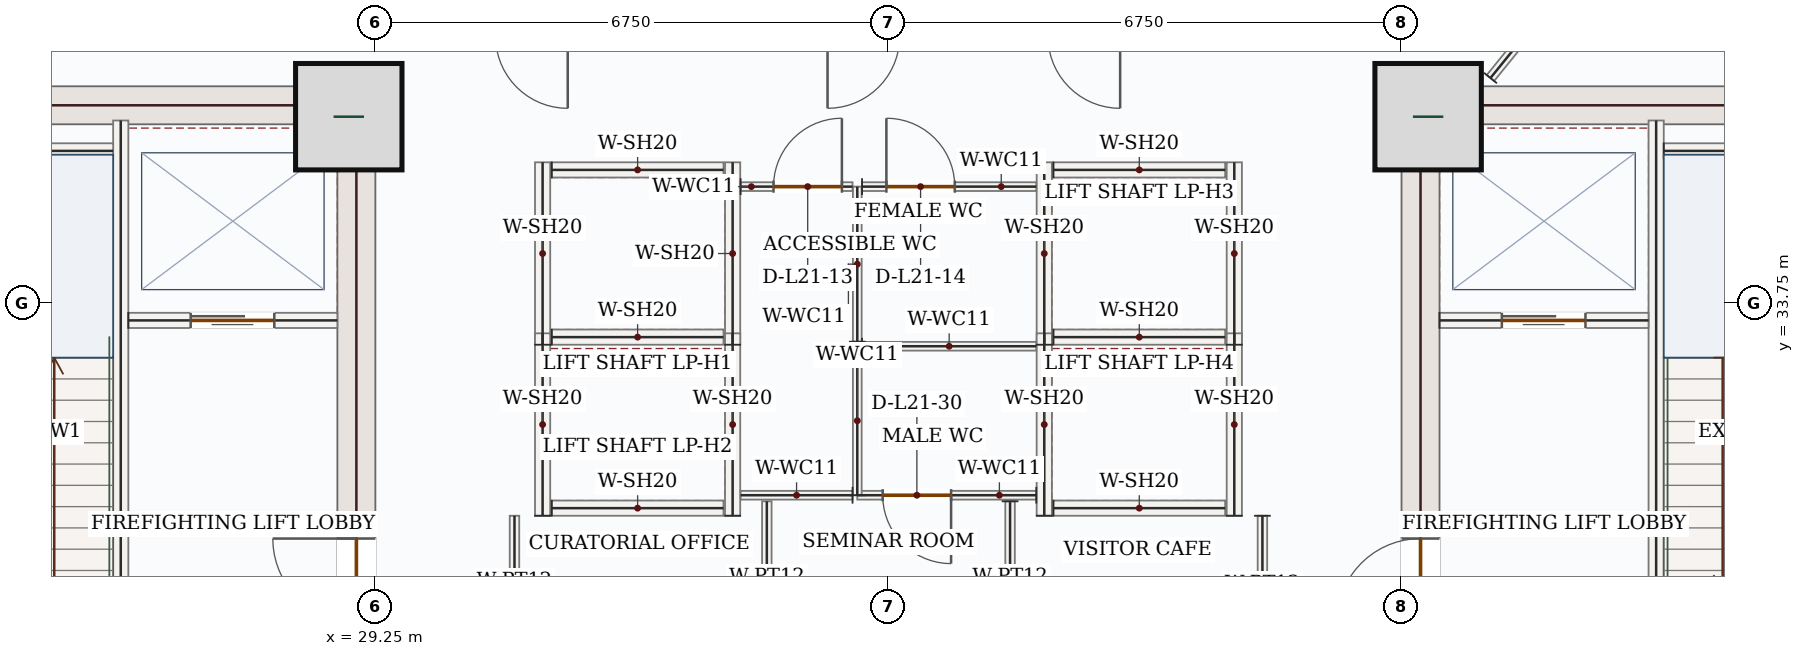
"""IFC4 building model, lengths in metres.
Left out: names, types, materials, properties, quantities, classifications, styles, units other than length and angle.
Written with IfcOpenShell. Run it as: python <this file> out.ifc"""

import sys

from ifc_helpers import new_model, si_unit, direction, frame, frame_2d, origin, origin_2d, place, context, subcontext, project, spatial, rectangle, extrude, source, transform, mapped, element, fill, save


model = new_model("IFC4")
c1 = context("Model", 3, precision=1e-05, world=origin(), true_north=direction((0.0, 1.0)))
c2 = subcontext(c1, "Body", "Model", "MODEL_VIEW")
j1 = project(units=[si_unit("LENGTHUNIT", "METRE"), si_unit("PLANEANGLEUNIT", "RADIAN")], contexts=[c1])
p1 = place(None, origin())
s1 = spatial("IfcSite", under=j1, at=p1, CompositionType="ELEMENT")
p2 = place(p1, origin())
s2 = spatial("IfcBuilding", under=s1, at=p2, CompositionType="ELEMENT")
p3 = place(p2, frame((0.0, 0.0, 96.3)))
s3 = spatial("IfcBuildingStorey", under=s2, at=p3, CompositionType="ELEMENT", Elevation=96.3)
p4 = place(p3, frame((29.0, 28.05, 0.0), z_axis=(0.0, 0.0, 1.0), x_axis=(0.0, 1.0, 0.0)))
e1 = element("IfcWall", 1, at=p4, inside=s3, PredefinedType="SHEAR", context=c2, shape_type="SweptSolid", body=[
    extrude(rectangle(XDim=8.55, YDim=0.5, at=frame_2d((4.275, 0.0))), origin(), (0.0, 0.0, 1.0), 3.95),
])
p5 = place(p4, frame((1.5, 0.0, 0.0)))
e2 = element("IfcOpeningElement", 2, at=p5, cuts=e1, PredefinedType="OPENING", context=c2, shape_type="SweptSolid", body=[
    extrude(rectangle(XDim=1.1, YDim=2.2, at=frame_2d((0.55, 1.1))), frame((0.0, 0.26, 0.0), z_axis=(0.0, -1.0, 0.0), x_axis=(1.0, 0.0, 0.0)), (0.0, 0.0, 1.0), 0.52),
])
m1 = source(origin(), c2, "Body", "SweptSolid", [
    extrude(rectangle(XDim=7.0, YDim=0.5, at=frame_2d((3.5, 0.0))), origin(), (0.0, 0.0, 1.0), 3.95),
])
p6 = place(p3, frame((21.75, 36.35, 0.0), z_axis=(0.0, 0.0, 1.0), x_axis=(1.0, 0.0, 0.0)))
e3 = element("IfcWall", 3, at=p6, inside=s3, PredefinedType="SHEAR", context=c2, shape_type="MappedRepresentation", body=[
    mapped(m1, transform((0.0, 0.0, 0.0), x_axis=(1.0, 0.0, 0.0), y_axis=(0.0, 1.0, 0.0), z_axis=(0.0, 0.0, 1.0), scale=1.0)),
])
p7 = place(p3, frame((43.0, 28.05, 0.0), z_axis=(0.0, 0.0, 1.0), x_axis=(0.0, 1.0, 0.0)))
e4 = element("IfcWall", 4, at=p7, inside=s3, PredefinedType="SHEAR", context=c2, shape_type="SweptSolid", body=[
    extrude(rectangle(XDim=8.55, YDim=0.5, at=frame_2d((4.275, 0.0))), origin(), (0.0, 0.0, 1.0), 3.95),
])
p8 = place(p7, frame((1.5, 0.0, 0.0)))
e5 = element("IfcOpeningElement", 5, at=p8, cuts=e4, PredefinedType="OPENING", context=c2, shape_type="SweptSolid", body=[
    extrude(rectangle(XDim=1.1, YDim=2.2, at=frame_2d((0.55, 1.1))), frame((0.0, 0.26, 0.0), z_axis=(0.0, -1.0, 0.0), x_axis=(1.0, 0.0, 0.0)), (0.0, 0.0, 1.0), 0.52),
])
p9 = place(p3, frame((43.25, 36.35, 0.0), z_axis=(0.0, 0.0, 1.0), x_axis=(1.0, 0.0, 0.0)))
e6 = element("IfcWall", 6, at=p9, inside=s3, PredefinedType="SHEAR", context=c2, shape_type="MappedRepresentation", body=[
    mapped(m1, transform((0.0, 0.0, 0.0), x_axis=(1.0, 0.0, 0.0), y_axis=(0.0, 1.0, 0.0), z_axis=(0.0, 0.0, 1.0), scale=1.0)),
])
m2 = source(origin(), c2, "Body", "SweptSolid", [
    extrude(rectangle(XDim=1.4, YDim=1.4, at=origin_2d()), origin(), (0.0, 0.0, 1.0), 4.2),
])
for number, where, z_axis, x_axis in (
    (7, (28.9, 36.2, 0.0), (0.0, 0.0, 1.0), (1.0, 0.0, 0.0)),
    (8, (43.1, 36.2, 0.0), (0.0, 0.0, 1.0), (1.0, 0.0, 0.0)),
):
    element("IfcColumn", number, at=place(p3, frame(where, z_axis=z_axis, x_axis=x_axis)), inside=s3, PredefinedType="COLUMN", context=c2, shape_type="MappedRepresentation", body=[
        mapped(m2, transform((0.0, 0.0, 0.0), x_axis=(1.0, 0.0, 0.0), y_axis=(0.0, 1.0, 0.0), z_axis=(0.0, 0.0, 1.0), scale=1.0)),
    ])
p10 = place(p3, frame((25.9, 28.15, 0.0), z_axis=(0.0, 0.0, 1.0), x_axis=(0.0, 1.0, 0.0)))
e9 = element("IfcWall", 9, at=p10, inside=s3, PredefinedType="SOLIDWALL", context=c2, shape_type="SweptSolid", body=[
    extrude(rectangle(XDim=8.0, YDim=0.2, at=frame_2d((4.0, 0.0))), origin(), (0.0, 0.0, 1.0), 3.95),
])
p11 = place(p10, frame((0.4, 0.0, 0.0)))
e10 = element("IfcOpeningElement", 10, at=p11, cuts=e9, PredefinedType="OPENING", context=c2, shape_type="SweptSolid", body=[
    extrude(rectangle(XDim=1.05, YDim=2.15, at=frame_2d((0.525, 1.075))), frame((0.0, 0.11, 0.0), z_axis=(0.0, -1.0, 0.0), x_axis=(1.0, 0.0, 0.0)), (0.0, 0.0, 1.0), 0.22),
])
p12 = place(p3, frame((46.1, 28.15, 0.0), z_axis=(0.0, 0.0, 1.0), x_axis=(0.0, 1.0, 0.0)))
e11 = element("IfcWall", 11, at=p12, inside=s3, PredefinedType="SOLIDWALL", context=c2, shape_type="SweptSolid", body=[
    extrude(rectangle(XDim=8.0, YDim=0.2, at=frame_2d((4.0, 0.0))), origin(), (0.0, 0.0, 1.0), 3.95),
])
p13 = place(p12, frame((0.4, 0.0, 0.0)))
e12 = element("IfcOpeningElement", 12, at=p13, cuts=e11, PredefinedType="OPENING", context=c2, shape_type="SweptSolid", body=[
    extrude(rectangle(XDim=1.05, YDim=2.15, at=frame_2d((0.525, 1.075))), frame((0.0, 0.11, 0.0), z_axis=(0.0, -1.0, 0.0), x_axis=(1.0, 0.0, 0.0)), (0.0, 0.0, 1.0), 0.22),
])
m3 = source(origin(), c2, "Body", "SweptSolid", [
    extrude(rectangle(XDim=3.25, YDim=0.2, at=frame_2d((1.625, 0.0))), origin(), (0.0, 0.0, 1.0), 3.95),
])
for number, where, z_axis, x_axis in (
    (13, (22.55, 35.75, 0.0), (0.0, 0.0, 1.0), (1.0, 0.0, 0.0)),
    (14, (46.2, 35.75, 0.0), (0.0, 0.0, 1.0), (1.0, 0.0, 0.0)),
):
    element("IfcWall", number, at=place(p3, frame(where, z_axis=z_axis, x_axis=x_axis)), inside=s3, PredefinedType="SOLIDWALL", context=c2, shape_type="MappedRepresentation", body=[
        mapped(m3, transform((0.0, 0.0, 0.0), x_axis=(1.0, 0.0, 0.0), y_axis=(0.0, 1.0, 0.0), z_axis=(0.0, 0.0, 1.0), scale=1.0)),
    ])
p14 = place(p3, frame((26.0, 33.52, 0.0), z_axis=(0.0, 0.0, 1.0), x_axis=(1.0, 0.0, 0.0)))
e15 = element("IfcWall", 15, at=p14, inside=s3, PredefinedType="SOLIDWALL", context=c2, shape_type="SweptSolid", body=[
    extrude(rectangle(XDim=2.75, YDim=0.2, at=frame_2d((1.375, 0.0))), origin(), (0.0, 0.0, 1.0), 3.95),
])
p15 = place(p14, frame((0.82, 0.0, 0.0)))
e16 = element("IfcOpeningElement", 16, at=p15, cuts=e15, PredefinedType="OPENING", context=c2, shape_type="SweptSolid", body=[
    extrude(rectangle(XDim=1.1, YDim=2.15, at=frame_2d((0.55, 1.075))), frame((0.0, 0.11, 0.0), z_axis=(0.0, -1.0, 0.0), x_axis=(1.0, 0.0, 0.0)), (0.0, 0.0, 1.0), 0.22),
])
p16 = place(p3, frame((43.25, 33.52, 0.0), z_axis=(0.0, 0.0, 1.0), x_axis=(1.0, 0.0, 0.0)))
e17 = element("IfcWall", 17, at=p16, inside=s3, PredefinedType="SOLIDWALL", context=c2, shape_type="SweptSolid", body=[
    extrude(rectangle(XDim=2.75, YDim=0.2, at=frame_2d((1.375, 0.0))), origin(), (0.0, 0.0, 1.0), 3.95),
])
p17 = place(p16, frame((0.82, 0.0, 0.0)))
e18 = element("IfcOpeningElement", 18, at=p17, cuts=e17, PredefinedType="OPENING", context=c2, shape_type="SweptSolid", body=[
    extrude(rectangle(XDim=1.1, YDim=2.15, at=frame_2d((0.55, 1.075))), frame((0.0, 0.11, 0.0), z_axis=(0.0, -1.0, 0.0), x_axis=(1.0, 0.0, 0.0)), (0.0, 0.0, 1.0), 0.22),
])
m4 = source(origin(), c2, "Body", "SweptSolid", [
    extrude(rectangle(XDim=2.4, YDim=0.2, at=frame_2d((1.2, 0.0))), origin(), (0.0, 0.0, 1.0), 3.95),
])
for number, where, z_axis, x_axis in (
    (19, (31.45, 33.2, 0.0), (0.0, 0.0, 1.0), (0.0, 1.0, 0.0)),
    (20, (33.95, 33.2, 0.0), (0.0, 0.0, 1.0), (0.0, 1.0, 0.0)),
):
    element("IfcWall", number, at=place(p3, frame(where, z_axis=z_axis, x_axis=x_axis)), inside=s3, PredefinedType="SOLIDWALL", context=c2, shape_type="MappedRepresentation", body=[
        mapped(m4, transform((0.0, 0.0, 0.0), x_axis=(1.0, 0.0, 0.0), y_axis=(0.0, 1.0, 0.0), z_axis=(0.0, 0.0, 1.0), scale=1.0)),
    ])
m5 = source(origin(), c2, "Body", "SweptSolid", [
    extrude(rectangle(XDim=2.26, YDim=0.2, at=frame_2d((1.13, 0.0))), origin(), (0.0, 0.0, 1.0), 3.95),
])
for number, where, z_axis, x_axis in (
    (21, (31.57, 33.3, 0.0), (0.0, 0.0, 1.0), (1.0, 0.0, 0.0)),
    (22, (31.57, 35.5, 0.0), (0.0, 0.0, 1.0), (1.0, 0.0, 0.0)),
):
    element("IfcWall", number, at=place(p3, frame(where, z_axis=z_axis, x_axis=x_axis)), inside=s3, PredefinedType="SOLIDWALL", context=c2, shape_type="MappedRepresentation", body=[
        mapped(m5, transform((0.0, 0.0, 0.0), x_axis=(1.0, 0.0, 0.0), y_axis=(0.0, 1.0, 0.0), z_axis=(0.0, 0.0, 1.0), scale=1.0)),
    ])
for number, where, z_axis, x_axis in (
    (23, (31.45, 30.95, 0.0), (0.0, 0.0, 1.0), (0.0, 1.0, 0.0)),
    (24, (33.95, 30.95, 0.0), (0.0, 0.0, 1.0), (0.0, 1.0, 0.0)),
):
    element("IfcWall", number, at=place(p3, frame(where, z_axis=z_axis, x_axis=x_axis)), inside=s3, PredefinedType="SOLIDWALL", context=c2, shape_type="MappedRepresentation", body=[
        mapped(m4, transform((0.0, 0.0, 0.0), x_axis=(1.0, 0.0, 0.0), y_axis=(0.0, 1.0, 0.0), z_axis=(0.0, 0.0, 1.0), scale=1.0)),
    ])
p18 = place(p3, frame((31.57, 31.05, 0.0), z_axis=(0.0, 0.0, 1.0), x_axis=(1.0, 0.0, 0.0)))
e25 = element("IfcWall", 25, at=p18, inside=s3, PredefinedType="SOLIDWALL", context=c2, shape_type="MappedRepresentation", body=[
    mapped(m5, transform((0.0, 0.0, 0.0), x_axis=(1.0, 0.0, 0.0), y_axis=(0.0, 1.0, 0.0), z_axis=(0.0, 0.0, 1.0), scale=1.0)),
])
for number, where, z_axis, x_axis in (
    (26, (38.05, 33.2, 0.0), (0.0, 0.0, 1.0), (0.0, 1.0, 0.0)),
    (27, (40.55, 33.2, 0.0), (0.0, 0.0, 1.0), (0.0, 1.0, 0.0)),
):
    element("IfcWall", number, at=place(p3, frame(where, z_axis=z_axis, x_axis=x_axis)), inside=s3, PredefinedType="SOLIDWALL", context=c2, shape_type="MappedRepresentation", body=[
        mapped(m4, transform((0.0, 0.0, 0.0), x_axis=(1.0, 0.0, 0.0), y_axis=(0.0, 1.0, 0.0), z_axis=(0.0, 0.0, 1.0), scale=1.0)),
    ])
for number, where, z_axis, x_axis in (
    (28, (38.17, 33.3, 0.0), (0.0, 0.0, 1.0), (1.0, 0.0, 0.0)),
    (29, (38.17, 35.5, 0.0), (0.0, 0.0, 1.0), (1.0, 0.0, 0.0)),
):
    element("IfcWall", number, at=place(p3, frame(where, z_axis=z_axis, x_axis=x_axis)), inside=s3, PredefinedType="SOLIDWALL", context=c2, shape_type="MappedRepresentation", body=[
        mapped(m5, transform((0.0, 0.0, 0.0), x_axis=(1.0, 0.0, 0.0), y_axis=(0.0, 1.0, 0.0), z_axis=(0.0, 0.0, 1.0), scale=1.0)),
    ])
for number, where, z_axis, x_axis in (
    (30, (38.05, 30.95, 0.0), (0.0, 0.0, 1.0), (0.0, 1.0, 0.0)),
    (31, (40.55, 30.95, 0.0), (0.0, 0.0, 1.0), (0.0, 1.0, 0.0)),
):
    element("IfcWall", number, at=place(p3, frame(where, z_axis=z_axis, x_axis=x_axis)), inside=s3, PredefinedType="SOLIDWALL", context=c2, shape_type="MappedRepresentation", body=[
        mapped(m4, transform((0.0, 0.0, 0.0), x_axis=(1.0, 0.0, 0.0), y_axis=(0.0, 1.0, 0.0), z_axis=(0.0, 0.0, 1.0), scale=1.0)),
    ])
p19 = place(p3, frame((38.17, 31.05, 0.0), z_axis=(0.0, 0.0, 1.0), x_axis=(1.0, 0.0, 0.0)))
e32 = element("IfcWall", 32, at=p19, inside=s3, PredefinedType="SOLIDWALL", context=c2, shape_type="MappedRepresentation", body=[
    mapped(m5, transform((0.0, 0.0, 0.0), x_axis=(1.0, 0.0, 0.0), y_axis=(0.0, 1.0, 0.0), z_axis=(0.0, 0.0, 1.0), scale=1.0)),
])
p20 = place(p3, frame((37.945, 31.22, 0.0), z_axis=(0.0, 0.0, 1.0), x_axis=(-1.0, 0.0, 0.0)))
e33 = element("IfcWall", 33, at=p20, inside=s3, PredefinedType="PARTITIONING", context=c2, shape_type="SweptSolid", body=[
    extrude(rectangle(XDim=2.355, YDim=0.115, at=frame_2d((1.177, 0.0))), origin(), (0.0, 0.0, 1.0), 3.95),
])
p21 = place(p20, frame((1.121, 0.0, 0.0)))
e34 = element("IfcOpeningElement", 34, at=p21, cuts=e33, PredefinedType="OPENING", context=c2, shape_type="SweptSolid", body=[
    extrude(rectangle(XDim=0.9, YDim=2.1, at=frame_2d((0.45, 1.05))), frame((0.0, 0.067, 0.0), z_axis=(0.0, -1.0, 0.0), x_axis=(1.0, 0.0, 0.0)), (0.0, 0.0, 1.0), 0.135),
])
m6 = source(origin(), c2, "Body", "SweptSolid", [
    extrude(rectangle(XDim=1.96, YDim=0.115, at=frame_2d((0.98, 0.0))), origin(), (0.0, 0.0, 1.0), 3.95),
])
p22 = place(p3, frame((35.59, 31.22, 0.0), z_axis=(0.0, 0.0, 1.0), x_axis=(0.0, 1.0, 0.0)))
e35 = element("IfcWall", 35, at=p22, inside=s3, PredefinedType="PARTITIONING", context=c2, shape_type="MappedRepresentation", body=[
    mapped(m6, transform((0.0, 0.0, 0.0), x_axis=(1.0, 0.0, 0.0), y_axis=(0.0, 1.0, 0.0), z_axis=(0.0, 0.0, 1.0), scale=1.0)),
])
m7 = source(origin(), c2, "Body", "SweptSolid", [
    extrude(rectangle(XDim=2.292, YDim=0.115, at=frame_2d((1.146, 0.0))), origin(), (0.0, 0.0, 1.0), 3.95),
])
p23 = place(p3, frame((35.653, 33.18, 0.0), z_axis=(0.0, 0.0, 1.0), x_axis=(1.0, 0.0, 0.0)))
e36 = element("IfcWall", 36, at=p23, inside=s3, PredefinedType="PARTITIONING", context=c2, shape_type="MappedRepresentation", body=[
    mapped(m7, transform((0.0, 0.0, 0.0), x_axis=(1.0, 0.0, 0.0), y_axis=(0.0, 1.0, 0.0), z_axis=(0.0, 0.0, 1.0), scale=1.0)),
])
m8 = source(origin(), c2, "Body", "SweptSolid", [
    extrude(rectangle(XDim=2.04, YDim=0.115, at=frame_2d((1.02, 0.0))), origin(), (0.0, 0.0, 1.0), 3.95),
])
p24 = place(p3, frame((35.59, 33.24, 0.0), z_axis=(0.0, 0.0, 1.0), x_axis=(0.0, 1.0, 0.0)))
e37 = element("IfcWall", 37, at=p24, inside=s3, PredefinedType="PARTITIONING", context=c2, shape_type="MappedRepresentation", body=[
    mapped(m8, transform((0.0, 0.0, 0.0), x_axis=(1.0, 0.0, 0.0), y_axis=(0.0, 1.0, 0.0), z_axis=(0.0, 0.0, 1.0), scale=1.0)),
])
p25 = place(p3, frame((35.653, 35.28, 0.0), z_axis=(0.0, 0.0, 1.0), x_axis=(1.0, 0.0, 0.0)))
e38 = element("IfcWall", 38, at=p25, inside=s3, PredefinedType="PARTITIONING", context=c2, shape_type="SweptSolid", body=[
    extrude(rectangle(XDim=2.292, YDim=0.115, at=frame_2d((1.146, 0.0))), origin(), (0.0, 0.0, 1.0), 3.95),
])
p26 = place(p25, frame((0.32, 0.0, 0.0)))
e39 = element("IfcOpeningElement", 39, at=p26, cuts=e38, PredefinedType="OPENING", context=c2, shape_type="SweptSolid", body=[
    extrude(rectangle(XDim=0.9, YDim=2.1, at=frame_2d((0.45, 1.05))), frame((0.0, 0.067, 0.0), z_axis=(0.0, -1.0, 0.0), x_axis=(1.0, 0.0, 0.0)), (0.0, 0.0, 1.0), 0.135),
])
m9 = source(origin(), c2, "Body", "SweptSolid", [
    extrude(rectangle(XDim=1.473, YDim=0.115, at=frame_2d((0.736, 0.0))), origin(), (0.0, 0.0, 1.0), 3.95),
])
p27 = place(p3, frame((35.528, 31.22, 0.0), z_axis=(0.0, 0.0, 1.0), x_axis=(-1.0, 0.0, 0.0)))
e40 = element("IfcWall", 40, at=p27, inside=s3, PredefinedType="PARTITIONING", context=c2, shape_type="MappedRepresentation", body=[
    mapped(m9, transform((0.0, 0.0, 0.0), x_axis=(1.0, 0.0, 0.0), y_axis=(0.0, 1.0, 0.0), z_axis=(0.0, 0.0, 1.0), scale=1.0)),
])
p28 = place(p3, frame((34.055, 35.28, 0.0), z_axis=(0.0, 0.0, 1.0), x_axis=(1.0, 0.0, 0.0)))
e41 = element("IfcWall", 41, at=p28, inside=s3, PredefinedType="PARTITIONING", context=c2, shape_type="SweptSolid", body=[
    extrude(rectangle(XDim=1.473, YDim=0.115, at=frame_2d((0.736, 0.0))), origin(), (0.0, 0.0, 1.0), 3.95),
])
p29 = place(p28, frame((0.433, 0.0, 0.0)))
e42 = element("IfcOpeningElement", 42, at=p29, cuts=e41, PredefinedType="OPENING", context=c2, shape_type="SweptSolid", body=[
    extrude(rectangle(XDim=0.9, YDim=2.1, at=frame_2d((0.45, 1.05))), frame((0.0, 0.067, 0.0), z_axis=(0.0, -1.0, 0.0), x_axis=(1.0, 0.0, 0.0)), (0.0, 0.0, 1.0), 0.135),
])
m10 = source(origin(), c2, "Body", "SweptSolid", [
    extrude(rectangle(XDim=2.66, YDim=0.125, at=frame_2d((1.33, 0.0))), origin(), (0.0, 0.0, 1.0), 3.95),
])
for number, where, z_axis, x_axis in (
    (43, (34.4, 28.48, 0.0), (0.0, 0.0, 1.0), (0.0, 1.0, 0.0)),
    (44, (37.6, 31.14, 0.0), (0.0, 0.0, 1.0), (0.0, -1.0, 0.0)),
):
    element("IfcWall", number, at=place(p3, frame(where, z_axis=z_axis, x_axis=x_axis)), inside=s3, PredefinedType="PARTITIONING", context=c2, shape_type="MappedRepresentation", body=[
        mapped(m10, transform((0.0, 0.0, 0.0), x_axis=(1.0, 0.0, 0.0), y_axis=(0.0, 1.0, 0.0), z_axis=(0.0, 0.0, 1.0), scale=1.0)),
    ])
m11 = source(origin(), c2, "Body", "SweptSolid", [
    extrude(rectangle(XDim=2.402, YDim=0.125, at=frame_2d((1.201, 0.0))), origin(), (0.0, 0.0, 1.0), 3.95),
])
p30 = place(p3, frame((31.08, 28.548, 0.0), z_axis=(0.0, 0.0, 1.0), x_axis=(0.0, 1.0, 0.0)))
e45 = element("IfcWall", 45, at=p30, inside=s3, PredefinedType="PARTITIONING", context=c2, shape_type="MappedRepresentation", body=[
    mapped(m11, transform((0.0, 0.0, 0.0), x_axis=(1.0, 0.0, 0.0), y_axis=(0.0, 1.0, 0.0), z_axis=(0.0, 0.0, 1.0), scale=1.0)),
])
m12 = source(origin(), c2, "Body", "SweptSolid", [
    extrude(rectangle(XDim=2.47, YDim=0.125, at=frame_2d((1.235, 0.0))), origin(), (0.0, 0.0, 1.0), 3.95),
])
p31 = place(p3, frame((40.92, 30.95, 0.0), z_axis=(0.0, 0.0, 1.0), x_axis=(0.0, -1.0, 0.0)))
e46 = element("IfcWall", 46, at=p31, inside=s3, PredefinedType="PARTITIONING", context=c2, shape_type="MappedRepresentation", body=[
    mapped(m12, transform((0.0, 0.0, 0.0), x_axis=(1.0, 0.0, 0.0), y_axis=(0.0, 1.0, 0.0), z_axis=(0.0, 0.0, 1.0), scale=1.0)),
])
m13 = source(origin(), c2, "Body", "SweptSolid", [
    extrude(rectangle(XDim=3.072, YDim=0.125, at=frame_2d((1.536, 0.0))), origin(), (0.0, 0.0, 1.0), 3.95),
])
p32 = place(p3, frame((43.92, 36.709, 0.0), z_axis=(0.0, 0.0, 1.0), x_axis=(0.629760486176, 0.776789373029, 0.0)))
e47 = element("IfcWall", 47, at=p32, inside=s3, PredefinedType="PARTITIONING", context=c2, shape_type="MappedRepresentation", body=[
    mapped(m13, transform((0.0, 0.0, 0.0), x_axis=(1.0, 0.0, 0.0), y_axis=(0.0, 1.0, 0.0), z_axis=(0.0, 0.0, 1.0), scale=1.0)),
])
m14 = source(origin(), c2, "Body", "SweptSolid", [
    extrude(rectangle(XDim=1.1, YDim=2.15, at=frame_2d((0.55, 1.075))), frame((0.0, 0.025, 0.0), z_axis=(0.0, -1.0, 0.0), x_axis=(1.0, 0.0, 0.0)), (0.0, 0.0, 1.0), 0.05),
])
p33 = place(p15, origin())
e48 = element("IfcDoor", 48, at=p33, inside=s3, OperationType="DOUBLE_DOOR_SLIDING", PredefinedType="DOOR", context=c2, shape_type="MappedRepresentation", body=[
    mapped(m14, transform((0.0, 0.0, 0.0), x_axis=(1.0, 0.0, 0.0), y_axis=(0.0, 1.0, 0.0), z_axis=(0.0, 0.0, 1.0), scale=1.0)),
])
fill(e16, e48)
p34 = place(p17, origin())
e49 = element("IfcDoor", 49, at=p34, inside=s3, OperationType="DOUBLE_DOOR_SLIDING", PredefinedType="DOOR", context=c2, shape_type="MappedRepresentation", body=[
    mapped(m14, transform((0.0, 0.0, 0.0), x_axis=(1.0, 0.0, 0.0), y_axis=(0.0, 1.0, 0.0), z_axis=(0.0, 0.0, 1.0), scale=1.0)),
])
fill(e18, e49)
m15 = source(origin(), c2, "Body", "SweptSolid", [
    extrude(rectangle(XDim=1.1, YDim=2.2, at=frame_2d((0.55, 1.1))), frame((0.0, 0.025, 0.0), z_axis=(0.0, -1.0, 0.0), x_axis=(1.0, 0.0, 0.0)), (0.0, 0.0, 1.0), 0.05),
])
p35 = place(p5, origin())
e50 = element("IfcDoor", 50, at=p35, inside=s3, OperationType="SINGLE_SWING_RIGHT", PredefinedType="DOOR", context=c2, shape_type="MappedRepresentation", body=[
    mapped(m15, transform((0.0, 0.0, 0.0), x_axis=(1.0, 0.0, 0.0), y_axis=(0.0, 1.0, 0.0), z_axis=(0.0, 0.0, 1.0), scale=1.0)),
])
fill(e2, e50)
p36 = place(p8, origin())
e51 = element("IfcDoor", 51, at=p36, inside=s3, OperationType="SINGLE_SWING_LEFT", PredefinedType="DOOR", context=c2, shape_type="MappedRepresentation", body=[
    mapped(m15, transform((0.0, 0.0, 0.0), x_axis=(1.0, 0.0, 0.0), y_axis=(0.0, 1.0, 0.0), z_axis=(0.0, 0.0, 1.0), scale=1.0)),
])
fill(e5, e51)
m16 = source(origin(), c2, "Body", "SweptSolid", [
    extrude(rectangle(XDim=0.9, YDim=2.1, at=frame_2d((0.45, 1.05))), frame((0.0, 0.025, 0.0), z_axis=(0.0, -1.0, 0.0), x_axis=(1.0, 0.0, 0.0)), (0.0, 0.0, 1.0), 0.05),
])
p37 = place(p29, origin())
e52 = element("IfcDoor", 52, at=p37, inside=s3, OperationType="SINGLE_SWING_RIGHT", PredefinedType="DOOR", context=c2, shape_type="MappedRepresentation", body=[
    mapped(m16, transform((0.0, 0.0, 0.0), x_axis=(1.0, 0.0, 0.0), y_axis=(0.0, 1.0, 0.0), z_axis=(0.0, 0.0, 1.0), scale=1.0)),
])
fill(e42, e52)
p38 = place(p26, origin())
e53 = element("IfcDoor", 53, at=p38, inside=s3, OperationType="SINGLE_SWING_LEFT", PredefinedType="DOOR", context=c2, shape_type="MappedRepresentation", body=[
    mapped(m16, transform((0.0, 0.0, 0.0), x_axis=(1.0, 0.0, 0.0), y_axis=(0.0, 1.0, 0.0), z_axis=(0.0, 0.0, 1.0), scale=1.0)),
])
fill(e39, e53)
p39 = place(p21, origin())
e54 = element("IfcDoor", 54, at=p39, inside=s3, OperationType="SINGLE_SWING_LEFT", PredefinedType="DOOR", context=c2, shape_type="MappedRepresentation", body=[
    mapped(m16, transform((0.0, 0.0, 0.0), x_axis=(1.0, 0.0, 0.0), y_axis=(0.0, 1.0, 0.0), z_axis=(0.0, 0.0, 1.0), scale=1.0)),
])
fill(e34, e54)
save(model, sys.argv[1])
